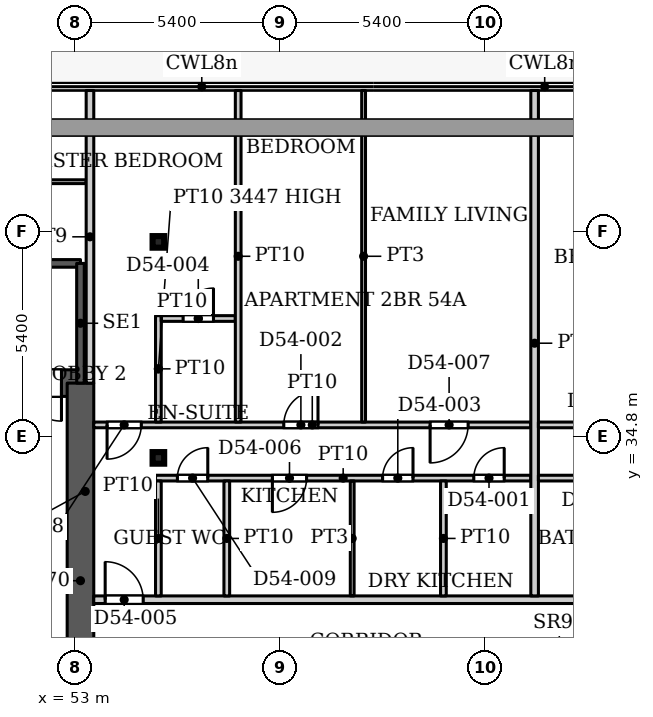
"""IFC4 building model, lengths in metres.
Left out: names, types, materials, properties, quantities, classifications, styles, units other than length and angle.
Written with IfcOpenShell. Run it as: python <this file> out.ifc"""

import sys

from ifc_helpers import new_model, si_unit, direction, frame, frame_2d, origin, origin_2d, place, context, subcontext, project, spatial, rectangle, hollow_rectangle, extrude, source, transform, mapped, element, fill, save


model = new_model("IFC4")
c1 = context("Model", 3, precision=1e-05, world=origin(), true_north=direction((0.0, 1.0)))
c2 = subcontext(c1, "Body", "Model", "MODEL_VIEW")
j1 = project(units=[si_unit("LENGTHUNIT", "METRE"), si_unit("PLANEANGLEUNIT", "RADIAN")], contexts=[c1])
p1 = place(None, origin())
s1 = spatial("IfcSite", under=j1, at=p1, CompositionType="ELEMENT")
p2 = place(p1, origin())
s2 = spatial("IfcBuilding", under=s1, at=p2, CompositionType="ELEMENT")
p3 = place(p2, frame((0.0, 0.0, 231.8)))
s3 = spatial("IfcBuildingStorey", under=s2, at=p3, CompositionType="ELEMENT", Elevation=231.8)
for number, where, z_axis, x_axis in (
    (1, (55.2, 34.232, 0.0), (0.0, 0.0, 1.0), (1.0, 0.0, 0.0)),
    (2, (55.2, 39.916, 0.0), (0.0, 0.0, 1.0), (1.0, 0.0, 0.0)),
):
    element("IfcColumn", number, at=place(p3, frame(where, z_axis=z_axis, x_axis=x_axis)), inside=s3, PredefinedType="COLUMN", context=c2, shape_type="SweptSolid", body=[
        extrude(hollow_rectangle(XDim=0.305, YDim=0.305, WallThickness=0.016, InnerFilletRadius=0.016, OuterFilletRadius=0.032, at=origin_2d()), origin(), (0.0, 0.0, 1.0), 3.9),
    ])
p4 = place(p3, frame((34.75, 36.2, 0.0), z_axis=(0.0, 0.0, 1.0), x_axis=(1.0, 0.0, 0.0)))
e3 = element("IfcWall", 3, at=p4, inside=s3, PredefinedType="SHEAR", context=c2, shape_type="SweptSolid", body=[
    extrude(rectangle(XDim=18.4, YDim=0.7, at=frame_2d((9.2, 0.0))), origin(), (0.0, 0.0, 1.0), 3.9),
])
p5 = place(p4, frame((16.9, 0.0, 0.0)))
e4 = element("IfcOpeningElement", 4, at=p5, cuts=e3, PredefinedType="OPENING", context=c2, shape_type="SweptSolid", body=[
    extrude(rectangle(XDim=1.0, YDim=2.2, at=frame_2d((0.5, 1.1))), frame((0.0, 0.36, 0.0), z_axis=(0.0, -1.0, 0.0), x_axis=(1.0, 0.0, 0.0)), (0.0, 0.0, 1.0), 0.72),
])
p6 = place(p3, frame((53.15, 25.8, 0.0), z_axis=(0.0, 0.0, 1.0), x_axis=(0.0, 1.0, 0.0)))
e5 = element("IfcWall", 5, at=p6, inside=s3, PredefinedType="SHEAR", context=c2, shape_type="SweptSolid", body=[
    extrude(rectangle(XDim=10.4, YDim=0.7, at=frame_2d((5.2, 0.0))), origin(), (0.0, 0.0, 1.0), 3.9),
])
p7 = place(p3, frame((43.99, 39.35, 0.0), z_axis=(0.0, 0.0, 1.0), x_axis=(1.0, 0.0, 0.0)))
e6 = element("IfcWall", 6, at=p7, inside=s3, PredefinedType="SHEAR", context=c2, shape_type="SweptSolid", body=[
    extrude(rectangle(XDim=9.16, YDim=0.2, at=frame_2d((4.58, 0.0))), origin(), (0.0, 0.0, 1.0), 3.9),
])
p8 = place(p3, frame((53.15, 36.2, 0.0), z_axis=(0.0, 0.0, 1.0), x_axis=(0.0, 1.0, 0.0)))
e7 = element("IfcWall", 7, at=p8, inside=s3, PredefinedType="SHEAR", context=c2, shape_type="SweptSolid", body=[
    extrude(rectangle(XDim=3.15, YDim=0.2, at=frame_2d((1.575, 0.0))), origin(), (0.0, 0.0, 1.0), 3.9),
])
p9 = place(p3, frame((38.349, 41.5, 0.0), z_axis=(0.0, 0.0, 1.0), x_axis=(1.0, 0.0, 0.0)))
e8 = element("IfcWall", 8, at=p9, inside=s3, PredefinedType="PARTITIONING", context=c2, shape_type="SweptSolid", body=[
    extrude(rectangle(XDim=14.951, YDim=0.1, at=frame_2d((7.476, 0.0))), origin(), (0.0, 0.0, 1.0), 3.6),
])
p10 = place(p9, frame((6.851, 0.0, 0.0)))
e9 = element("IfcOpeningElement", 9, at=p10, cuts=e8, PredefinedType="OPENING", context=c2, shape_type="SweptSolid", body=[
    extrude(rectangle(XDim=1.0, YDim=2.1, at=frame_2d((0.5, 1.05))), frame((0.0, 0.06, 0.0), z_axis=(0.0, -1.0, 0.0), x_axis=(1.0, 0.0, 0.0)), (0.0, 0.0, 1.0), 0.12),
])
p11 = place(p3, frame((53.4, 36.199, 0.0), z_axis=(0.0, 0.0, 1.0), x_axis=(0.0, 1.0, 0.0)))
e10 = element("IfcWall", 10, at=p11, inside=s3, PredefinedType="PARTITIONING", context=c2, shape_type="SweptSolid", body=[
    extrude(rectangle(XDim=7.701, YDim=0.2, at=frame_2d((3.851, 0.0))), origin(), (0.0, 0.0, 1.0), 3.6),
])
p12 = place(p3, frame((53.499, 30.5, 0.0), z_axis=(0.0, 0.0, 1.0), x_axis=(1.0, 0.0, 0.0)))
e11 = element("IfcWall", 11, at=p12, inside=s3, PredefinedType="PARTITIONING", context=c2, shape_type="SweptSolid", body=[
    extrude(rectangle(XDim=28.401, YDim=0.2, at=frame_2d((14.2, 0.0))), origin(), (0.0, 0.0, 1.0), 3.6),
])
p13 = place(p12, frame((0.301, 0.0, 0.0)))
e12 = element("IfcOpeningElement", 12, at=p13, cuts=e11, PredefinedType="OPENING", context=c2, shape_type="SweptSolid", body=[
    extrude(rectangle(XDim=1.0, YDim=2.1, at=frame_2d((0.5, 1.05))), frame((0.0, 0.11, 0.0), z_axis=(0.0, -1.0, 0.0), x_axis=(1.0, 0.0, 0.0)), (0.0, 0.0, 1.0), 0.22),
])
p14 = place(p12, frame((18.151, 0.0, 0.0)))
e13 = element("IfcOpeningElement", 13, at=p14, cuts=e11, PredefinedType="OPENING", context=c2, shape_type="SweptSolid", body=[
    extrude(rectangle(XDim=1.0, YDim=2.1, at=frame_2d((0.5, 1.05))), frame((0.0, 0.11, 0.0), z_axis=(0.0, -1.0, 0.0), x_axis=(1.0, 0.0, 0.0)), (0.0, 0.0, 1.0), 0.22),
])
p15 = place(p12, frame((25.801, 0.0, 0.0)))
e14 = element("IfcOpeningElement", 14, at=p15, cuts=e11, PredefinedType="OPENING", context=c2, shape_type="SweptSolid", body=[
    extrude(rectangle(XDim=1.0, YDim=2.1, at=frame_2d((0.5, 1.05))), frame((0.0, 0.11, 0.0), z_axis=(0.0, -1.0, 0.0), x_axis=(1.0, 0.0, 0.0)), (0.0, 0.0, 1.0), 0.22),
])
p16 = place(p3, frame((53.499, 35.1, 0.0), z_axis=(0.0, 0.0, 1.0), x_axis=(1.0, 0.0, 0.0)))
e15 = element("IfcWall", 15, at=p16, inside=s3, PredefinedType="PARTITIONING", context=c2, shape_type="SweptSolid", body=[
    extrude(rectangle(XDim=11.501, YDim=0.15, at=frame_2d((5.75, 0.0))), origin(), (0.0, 0.0, 1.0), 3.6),
])
p17 = place(p16, frame((5.001, 0.0, 0.0)))
e16 = element("IfcOpeningElement", 16, at=p17, cuts=e15, PredefinedType="OPENING", context=c2, shape_type="SweptSolid", body=[
    extrude(rectangle(XDim=0.9, YDim=2.1, at=frame_2d((0.45, 1.05))), frame((0.0, 0.085, 0.0), z_axis=(0.0, -1.0, 0.0), x_axis=(1.0, 0.0, 0.0)), (0.0, 0.0, 1.0), 0.17),
])
p18 = place(p16, frame((8.851, 0.0, 0.0)))
e17 = element("IfcOpeningElement", 17, at=p18, cuts=e15, PredefinedType="OPENING", context=c2, shape_type="SweptSolid", body=[
    extrude(rectangle(XDim=1.0, YDim=2.1, at=frame_2d((0.5, 1.05))), frame((0.0, 0.085, 0.0), z_axis=(0.0, -1.0, 0.0), x_axis=(1.0, 0.0, 0.0)), (0.0, 0.0, 1.0), 0.17),
])
p19 = place(p16, frame((0.351, 0.0, 0.0)))
e18 = element("IfcOpeningElement", 18, at=p19, cuts=e15, PredefinedType="OPENING", context=c2, shape_type="SweptSolid", body=[
    extrude(rectangle(XDim=0.9, YDim=2.1, at=frame_2d((0.45, 1.05))), frame((0.0, 0.085, 0.0), z_axis=(0.0, -1.0, 0.0), x_axis=(1.0, 0.0, 0.0)), (0.0, 0.0, 1.0), 0.17),
])
p20 = place(p3, frame((55.125, 33.7, 0.0), z_axis=(0.0, 0.0, 1.0), x_axis=(1.0, 0.0, 0.0)))
e19 = element("IfcWall", 19, at=p20, inside=s3, PredefinedType="PARTITIONING", context=c2, shape_type="SweptSolid", body=[
    extrude(rectangle(XDim=9.875, YDim=0.15, at=frame_2d((4.938, 0.0))), origin(), (0.0, 0.0, 1.0), 3.6),
])
p21 = place(p20, frame((8.375, 0.0, 0.0)))
e20 = element("IfcOpeningElement", 20, at=p21, cuts=e19, PredefinedType="OPENING", context=c2, shape_type="SweptSolid", body=[
    extrude(rectangle(XDim=0.8, YDim=2.1, at=frame_2d((0.4, 1.05))), frame((0.0, 0.085, 0.0), z_axis=(0.0, -1.0, 0.0), x_axis=(1.0, 0.0, 0.0)), (0.0, 0.0, 1.0), 0.17),
])
p22 = place(p20, frame((5.975, 0.0, 0.0)))
e21 = element("IfcOpeningElement", 21, at=p22, cuts=e19, PredefinedType="OPENING", context=c2, shape_type="SweptSolid", body=[
    extrude(rectangle(XDim=0.8, YDim=2.1, at=frame_2d((0.4, 1.05))), frame((0.0, 0.085, 0.0), z_axis=(0.0, -1.0, 0.0), x_axis=(1.0, 0.0, 0.0)), (0.0, 0.0, 1.0), 0.17),
])
p23 = place(p20, frame((3.075, 0.0, 0.0)))
e22 = element("IfcOpeningElement", 22, at=p23, cuts=e19, PredefinedType="OPENING", context=c2, shape_type="SweptSolid", body=[
    extrude(rectangle(XDim=0.9, YDim=2.1, at=frame_2d((0.45, 1.05))), frame((0.0, 0.085, 0.0), z_axis=(0.0, -1.0, 0.0), x_axis=(1.0, 0.0, 0.0)), (0.0, 0.0, 1.0), 0.17),
])
p24 = place(p20, frame((0.575, 0.0, 0.0)))
e23 = element("IfcOpeningElement", 23, at=p24, cuts=e19, PredefinedType="OPENING", context=c2, shape_type="SweptSolid", body=[
    extrude(rectangle(XDim=0.8, YDim=2.1, at=frame_2d((0.4, 1.05))), frame((0.0, 0.085, 0.0), z_axis=(0.0, -1.0, 0.0), x_axis=(1.0, 0.0, 0.0)), (0.0, 0.0, 1.0), 0.17),
])
p25 = place(p3, frame((55.2, 30.6, 0.0), z_axis=(0.0, 0.0, 1.0), x_axis=(0.0, 1.0, 0.0)))
e24 = element("IfcWall", 24, at=p25, inside=s3, PredefinedType="PARTITIONING", context=c2, shape_type="SweptSolid", body=[
    extrude(rectangle(XDim=3.025, YDim=0.15, at=frame_2d((1.512, 0.0))), origin(), (0.0, 0.0, 1.0), 3.6),
])
p26 = place(p3, frame((55.2, 35.175, 0.0), z_axis=(0.0, 0.0, 1.0), x_axis=(0.0, 1.0, 0.0)))
e25 = element("IfcWall", 25, at=p26, inside=s3, PredefinedType="PARTITIONING", context=c2, shape_type="SweptSolid", body=[
    extrude(rectangle(XDim=2.8, YDim=0.15, at=frame_2d((1.4, 0.0))), origin(), (0.0, 0.0, 1.0), 3.447),
])
p27 = place(p3, frame((55.275, 37.9, 0.0), z_axis=(0.0, 0.0, 1.0), x_axis=(1.0, 0.0, 0.0)))
e26 = element("IfcWall", 26, at=p27, inside=s3, PredefinedType="PARTITIONING", context=c2, shape_type="SweptSolid", body=[
    extrude(rectangle(XDim=1.95, YDim=0.15, at=frame_2d((0.975, 0.0))), origin(), (0.0, 0.0, 1.0), 3.6),
])
p28 = place(p27, frame((0.575, 0.0, 0.0)))
e27 = element("IfcOpeningElement", 27, at=p28, cuts=e26, PredefinedType="OPENING", context=c2, shape_type="SweptSolid", body=[
    extrude(rectangle(XDim=0.8, YDim=2.1, at=frame_2d((0.4, 1.05))), frame((0.0, 0.085, 0.0), z_axis=(0.0, -1.0, 0.0), x_axis=(1.0, 0.0, 0.0)), (0.0, 0.0, 1.0), 0.17),
])
p29 = place(p3, frame((57.0, 30.6, 0.0), z_axis=(0.0, 0.0, 1.0), x_axis=(0.0, 1.0, 0.0)))
e28 = element("IfcWall", 28, at=p29, inside=s3, PredefinedType="PARTITIONING", context=c2, shape_type="SweptSolid", body=[
    extrude(rectangle(XDim=3.025, YDim=0.15, at=frame_2d((1.512, 0.0))), origin(), (0.0, 0.0, 1.0), 3.6),
])
p30 = place(p3, frame((57.3, 35.175, 0.0), z_axis=(0.0, 0.0, 1.0), x_axis=(0.0, 1.0, 0.0)))
e29 = element("IfcWall", 29, at=p30, inside=s3, PredefinedType="PARTITIONING", context=c2, shape_type="SweptSolid", body=[
    extrude(rectangle(XDim=8.725, YDim=0.15, at=frame_2d((4.362, 0.0))), origin(), (0.0, 0.0, 1.0), 3.6),
])
p31 = place(p3, frame((60.3, 30.6, 0.0), z_axis=(0.0, 0.0, 1.0), x_axis=(0.0, 1.0, 0.0)))
e30 = element("IfcWall", 30, at=p31, inside=s3, PredefinedType="PARTITIONING", context=c2, shape_type="SweptSolid", body=[
    extrude(rectangle(XDim=3.025, YDim=0.1, at=frame_2d((1.512, 0.0))), origin(), (0.0, 0.0, 1.0), 3.6),
])
p32 = place(p3, frame((60.6, 35.175, 0.0), z_axis=(0.0, 0.0, 1.0), x_axis=(0.0, 1.0, 0.0)))
e31 = element("IfcWall", 31, at=p32, inside=s3, PredefinedType="PARTITIONING", context=c2, shape_type="SweptSolid", body=[
    extrude(rectangle(XDim=8.725, YDim=0.1, at=frame_2d((4.362, 0.0))), origin(), (0.0, 0.0, 1.0), 3.6),
])
p33 = place(p3, frame((62.7, 30.6, 0.0), z_axis=(0.0, 0.0, 1.0), x_axis=(0.0, 1.0, 0.0)))
e32 = element("IfcWall", 32, at=p33, inside=s3, PredefinedType="PARTITIONING", context=c2, shape_type="SweptSolid", body=[
    extrude(rectangle(XDim=3.025, YDim=0.15, at=frame_2d((1.512, 0.0))), origin(), (0.0, 0.0, 1.0), 3.6),
])
p34 = place(p3, frame((65.1, 30.6, 0.0), z_axis=(0.0, 0.0, 1.0), x_axis=(0.0, 1.0, 0.0)))
e33 = element("IfcWall", 33, at=p34, inside=s3, PredefinedType="PARTITIONING", context=c2, shape_type="SweptSolid", body=[
    extrude(rectangle(XDim=13.3, YDim=0.2, at=frame_2d((6.65, 0.0))), origin(), (0.0, 0.0, 1.0), 3.6),
])
p35 = place(p3, frame((65.2, 33.7, 0.0), z_axis=(0.0, 0.0, 1.0), x_axis=(1.0, 0.0, 0.0)))
e34 = element("IfcWall", 34, at=p35, inside=s3, PredefinedType="PARTITIONING", context=c2, shape_type="SweptSolid", body=[
    extrude(rectangle(XDim=5.975, YDim=0.15, at=frame_2d((2.988, 0.0))), origin(), (0.0, 0.0, 1.0), 3.6),
])
p36 = place(p35, frame((4.3, 0.0, 0.0)))
e35 = element("IfcOpeningElement", 35, at=p36, cuts=e34, PredefinedType="OPENING", context=c2, shape_type="SweptSolid", body=[
    extrude(rectangle(XDim=0.8, YDim=2.1, at=frame_2d((0.4, 1.05))), frame((0.0, 0.085, 0.0), z_axis=(0.0, -1.0, 0.0), x_axis=(1.0, 0.0, 0.0)), (0.0, 0.0, 1.0), 0.17),
])
p37 = place(p35, frame((1.25, 0.0, 0.0)))
e36 = element("IfcOpeningElement", 36, at=p37, cuts=e34, PredefinedType="OPENING", context=c2, shape_type="SweptSolid", body=[
    extrude(rectangle(XDim=0.9, YDim=2.1, at=frame_2d((0.45, 1.05))), frame((0.0, 0.085, 0.0), z_axis=(0.0, -1.0, 0.0), x_axis=(1.0, 0.0, 0.0)), (0.0, 0.0, 1.0), 0.17),
])
p38 = place(p3, frame((65.2, 35.1, 0.0), z_axis=(0.0, 0.0, 1.0), x_axis=(1.0, 0.0, 0.0)))
e37 = element("IfcWall", 37, at=p38, inside=s3, PredefinedType="PARTITIONING", context=c2, shape_type="SweptSolid", body=[
    extrude(rectangle(XDim=9.7, YDim=0.15, at=frame_2d((4.85, 0.0))), origin(), (0.0, 0.0, 1.0), 3.6),
])
p39 = place(p38, frame((1.4, 0.0, 0.0)))
e38 = element("IfcOpeningElement", 38, at=p39, cuts=e37, PredefinedType="OPENING", context=c2, shape_type="SweptSolid", body=[
    extrude(rectangle(XDim=0.9, YDim=2.1, at=frame_2d((0.45, 1.05))), frame((0.0, 0.085, 0.0), z_axis=(0.0, -1.0, 0.0), x_axis=(1.0, 0.0, 0.0)), (0.0, 0.0, 1.0), 0.17),
])
p40 = place(p38, frame((6.3, 0.0, 0.0)))
e39 = element("IfcOpeningElement", 39, at=p40, cuts=e37, PredefinedType="OPENING", context=c2, shape_type="SweptSolid", body=[
    extrude(rectangle(XDim=1.0, YDim=2.1, at=frame_2d((0.5, 1.05))), frame((0.0, 0.085, 0.0), z_axis=(0.0, -1.0, 0.0), x_axis=(1.0, 0.0, 0.0)), (0.0, 0.0, 1.0), 0.17),
])
m1 = source(origin(), c2, "Body", "SweptSolid", [
    extrude(rectangle(XDim=1.0, YDim=2.2, at=frame_2d((0.5, 1.1))), frame((0.0, 0.025, 0.0), z_axis=(0.0, -1.0, 0.0), x_axis=(1.0, 0.0, 0.0)), (0.0, 0.0, 1.0), 0.05),
])
p41 = place(p5, origin())
e40 = element("IfcDoor", 40, at=p41, inside=s3, OperationType="SINGLE_SWING_RIGHT", PredefinedType="DOOR", context=c2, shape_type="MappedRepresentation", body=[
    mapped(m1, transform((0.0, 0.0, 0.0), x_axis=(1.0, 0.0, 0.0), y_axis=(0.0, 1.0, 0.0), z_axis=(0.0, 0.0, 1.0), scale=1.0)),
])
fill(e4, e40)
m2 = source(origin(), c2, "Body", "SweptSolid", [
    extrude(rectangle(XDim=0.8, YDim=2.1, at=frame_2d((0.4, 1.05))), frame((0.0, 0.025, 0.0), z_axis=(0.0, -1.0, 0.0), x_axis=(1.0, 0.0, 0.0)), (0.0, 0.0, 1.0), 0.05),
])
p42 = place(p21, origin())
e41 = element("IfcDoor", 41, at=p42, inside=s3, OperationType="SINGLE_SWING_LEFT", PredefinedType="DOOR", context=c2, shape_type="MappedRepresentation", body=[
    mapped(m2, transform((0.0, 0.0, 0.0), x_axis=(1.0, 0.0, 0.0), y_axis=(0.0, 1.0, 0.0), z_axis=(0.0, 0.0, 1.0), scale=1.0)),
])
fill(e20, e41)
m3 = source(origin(), c2, "Body", "SweptSolid", [
    extrude(rectangle(XDim=0.9, YDim=2.1, at=frame_2d((0.45, 1.05))), frame((0.0, 0.025, 0.0), z_axis=(0.0, -1.0, 0.0), x_axis=(1.0, 0.0, 0.0)), (0.0, 0.0, 1.0), 0.05),
])
p43 = place(p17, origin())
e42 = element("IfcDoor", 42, at=p43, inside=s3, OperationType="SINGLE_SWING_LEFT", PredefinedType="DOOR", context=c2, shape_type="MappedRepresentation", body=[
    mapped(m3, transform((0.0, 0.0, 0.0), x_axis=(1.0, 0.0, 0.0), y_axis=(0.0, 1.0, 0.0), z_axis=(0.0, 0.0, 1.0), scale=1.0)),
])
fill(e16, e42)
p44 = place(p22, origin())
e43 = element("IfcDoor", 43, at=p44, inside=s3, OperationType="SINGLE_SWING_LEFT", PredefinedType="DOOR", context=c2, shape_type="MappedRepresentation", body=[
    mapped(m2, transform((0.0, 0.0, 0.0), x_axis=(1.0, 0.0, 0.0), y_axis=(0.0, 1.0, 0.0), z_axis=(0.0, 0.0, 1.0), scale=1.0)),
])
fill(e21, e43)
p45 = place(p28, origin())
e44 = element("IfcDoor", 44, at=p45, inside=s3, OperationType="SINGLE_SWING_LEFT", PredefinedType="DOOR", context=c2, shape_type="MappedRepresentation", body=[
    mapped(m2, transform((0.0, 0.0, 0.0), x_axis=(1.0, 0.0, 0.0), y_axis=(0.0, 1.0, 0.0), z_axis=(0.0, 0.0, 1.0), scale=1.0)),
])
fill(e27, e44)
m4 = source(origin(), c2, "Body", "SweptSolid", [
    extrude(rectangle(XDim=1.0, YDim=2.1, at=frame_2d((0.5, 1.05))), frame((0.0, 0.025, 0.0), z_axis=(0.0, -1.0, 0.0), x_axis=(1.0, 0.0, 0.0)), (0.0, 0.0, 1.0), 0.05),
])
p46 = place(p13, origin())
e45 = element("IfcDoor", 45, at=p46, inside=s3, OperationType="SINGLE_SWING_LEFT", PredefinedType="DOOR", context=c2, shape_type="MappedRepresentation", body=[
    mapped(m4, transform((0.0, 0.0, 0.0), x_axis=(1.0, 0.0, 0.0), y_axis=(0.0, 1.0, 0.0), z_axis=(0.0, 0.0, 1.0), scale=1.0)),
])
fill(e12, e45)
p47 = place(p23, origin())
e46 = element("IfcDoor", 46, at=p47, inside=s3, OperationType="SINGLE_SWING_RIGHT", PredefinedType="DOOR", context=c2, shape_type="MappedRepresentation", body=[
    mapped(m3, transform((0.0, 0.0, 0.0), x_axis=(1.0, 0.0, 0.0), y_axis=(0.0, 1.0, 0.0), z_axis=(0.0, 0.0, 1.0), scale=1.0)),
])
fill(e22, e46)
m5 = source(origin(), c2, "Body", "SweptSolid", [
    extrude(rectangle(XDim=1.0, YDim=2.1, at=frame_2d((0.5, 1.05))), frame((0.0, 0.025, 0.0), z_axis=(0.0, -1.0, 0.0), x_axis=(1.0, 0.0, 0.0)), (0.0, 0.0, 1.0), 0.05),
])
p48 = place(p18, origin())
e47 = element("IfcDoor", 47, at=p48, inside=s3, OperationType="SINGLE_SWING_RIGHT", PredefinedType="DOOR", context=c2, shape_type="MappedRepresentation", body=[
    mapped(m5, transform((0.0, 0.0, 0.0), x_axis=(1.0, 0.0, 0.0), y_axis=(0.0, 1.0, 0.0), z_axis=(0.0, 0.0, 1.0), scale=1.0)),
])
fill(e17, e47)
p49 = place(p19, origin())
e48 = element("IfcDoor", 48, at=p49, inside=s3, OperationType="SINGLE_SWING_RIGHT", PredefinedType="DOOR", context=c2, shape_type="MappedRepresentation", body=[
    mapped(m3, transform((0.0, 0.0, 0.0), x_axis=(1.0, 0.0, 0.0), y_axis=(0.0, 1.0, 0.0), z_axis=(0.0, 0.0, 1.0), scale=1.0)),
])
fill(e18, e48)
p50 = place(p24, origin())
e49 = element("IfcDoor", 49, at=p50, inside=s3, OperationType="SINGLE_SWING_LEFT", PredefinedType="DOOR", context=c2, shape_type="MappedRepresentation", body=[
    mapped(m2, transform((0.0, 0.0, 0.0), x_axis=(1.0, 0.0, 0.0), y_axis=(0.0, 1.0, 0.0), z_axis=(0.0, 0.0, 1.0), scale=1.0)),
])
fill(e23, e49)
save(model, sys.argv[1])
